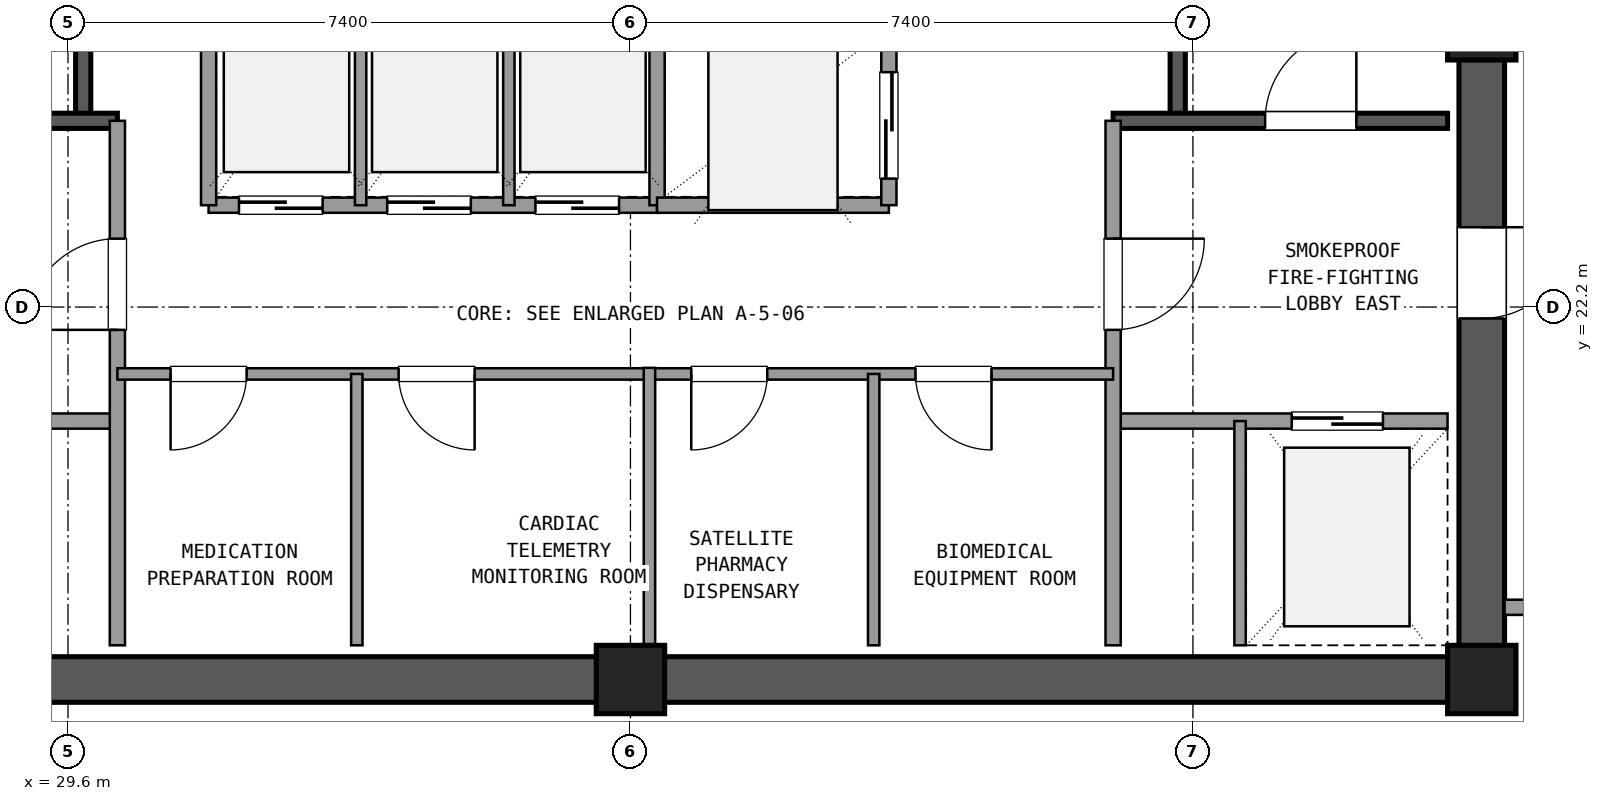
"""IFC4 building model, lengths in metres.
Left out: names, types, materials, properties, quantities, classifications, styles, units other than length and angle.
Written with IfcOpenShell. Run it as: python <this file> out.ifc"""

import sys

from ifc_helpers import new_model, si_unit, direction, frame, frame_2d, origin, origin_2d, place, context, subcontext, project, spatial, rectangle, extrude, element, fill, save


model = new_model("IFC4")
c1 = context("Model", 3, precision=1e-05, world=origin(), true_north=direction((0.0, 1.0)))
c2 = subcontext(c1, "Body", "Model", "MODEL_VIEW")
j1 = project(units=[si_unit("LENGTHUNIT", "METRE"), si_unit("PLANEANGLEUNIT", "RADIAN")], contexts=[c1])
p1 = place(None, origin())
s1 = spatial("IfcSite", under=j1, at=p1, CompositionType="ELEMENT")
p2 = place(p1, origin())
s2 = spatial("IfcBuilding", under=s1, at=p2, CompositionType="ELEMENT")
p3 = place(p2, frame((0.0, 0.0, 232.38)))
s3 = spatial("IfcBuildingStorey", under=s2, at=p3, CompositionType="ELEMENT", Elevation=232.38)
for number, where, z_axis, x_axis in (
    (1, (37.0, 17.3, 0.0), (0.0, 0.0, 1.0), (1.0, 0.0, 0.0)),
    (2, (48.2, 17.3, 0.0), (0.0, 0.0, 1.0), (1.0, 0.0, 0.0)),
    (3, (48.2, 25.9, 0.0), (0.0, 0.0, 1.0), (1.0, 0.0, 0.0)),
):
    element("IfcColumn", number, at=place(p3, frame(where, z_axis=z_axis, x_axis=x_axis)), inside=s3, PredefinedType="COLUMN", context=c2, shape_type="SweptSolid", body=[
        extrude(rectangle(XDim=0.9, YDim=0.9, at=origin_2d()), origin(), (0.0, 0.0, 1.0), 4.68),
    ])
for number, where, z_axis, x_axis in (
    (4, (26.245, 17.3, 0.0), (0.0, 0.0, 1.0), (1.0, 0.0, 0.0)),
    (5, (37.445, 17.3, 0.0), (0.0, 0.0, 1.0), (1.0, 0.0, 0.0)),
):
    element("IfcWall", number, at=place(p3, frame(where, z_axis=z_axis, x_axis=x_axis)), inside=s3, PredefinedType="SHEAR", context=c2, shape_type="SweptSolid", body=[
        extrude(rectangle(XDim=10.31, YDim=0.6, at=frame_2d((5.155, 0.0))), origin(), (0.0, 0.0, 1.0), 4.38),
    ])
p4 = place(p3, frame((48.2, 17.745, 0.0), z_axis=(0.0, 0.0, 1.0), x_axis=(0.0, 1.0, 0.0)))
e6 = element("IfcWall", 6, at=p4, inside=s3, PredefinedType="SHEAR", context=c2, shape_type="SweptSolid", body=[
    extrude(rectangle(XDim=7.71, YDim=0.6, at=frame_2d((3.855, 0.0))), origin(), (0.0, 0.0, 1.0), 4.38),
])
p5 = place(p4, frame((4.305, 0.0, 0.0)))
e7 = element("IfcOpeningElement", 7, at=p5, cuts=e6, PredefinedType="OPENING", context=c2, shape_type="SweptSolid", body=[
    extrude(rectangle(XDim=1.2, YDim=2.15, at=frame_2d((0.6, 1.075))), frame((0.0, 0.31, 0.0), z_axis=(0.0, -1.0, 0.0), x_axis=(1.0, 0.0, 0.0)), (0.0, 0.0, 1.0), 0.62),
])
p6 = place(p3, frame((29.8, 24.65, 0.0), z_axis=(0.0, 0.0, 1.0), x_axis=(0.0, 1.0, 0.0)))
e8 = element("IfcWall", 8, at=p6, inside=s3, PredefinedType="SHEAR", context=c2, shape_type="SweptSolid", body=[
    extrude(rectangle(XDim=9.4, YDim=0.2, at=frame_2d((4.7, 0.0))), origin(), (0.0, 0.0, 1.0), 4.38),
])
p7 = place(p3, frame((26.25, 24.65, 0.0), z_axis=(0.0, 0.0, 1.0), x_axis=(1.0, 0.0, 0.0)))
e9 = element("IfcWall", 9, at=p7, inside=s3, PredefinedType="SHEAR", context=c2, shape_type="SweptSolid", body=[
    extrude(rectangle(XDim=4.0, YDim=0.2, at=frame_2d((2.0, 0.0))), origin(), (0.0, 0.0, 1.0), 4.38),
])
p8 = place(p7, frame((1.0, 0.0, 0.0)))
e10 = element("IfcOpeningElement", 10, at=p8, cuts=e9, PredefinedType="OPENING", context=c2, shape_type="SweptSolid", body=[
    extrude(rectangle(XDim=1.2, YDim=2.15, at=frame_2d((0.6, 1.075))), frame((0.0, 0.11, 0.0), z_axis=(0.0, -1.0, 0.0), x_axis=(1.0, 0.0, 0.0)), (0.0, 0.0, 1.0), 0.22),
])
p9 = place(p3, frame((44.2, 24.65, 0.0), z_axis=(0.0, 0.0, 1.0), x_axis=(0.0, 1.0, 0.0)))
e11 = element("IfcWall", 11, at=p9, inside=s3, PredefinedType="SHEAR", context=c2, shape_type="SweptSolid", body=[
    extrude(rectangle(XDim=9.4, YDim=0.2, at=frame_2d((4.7, 0.0))), origin(), (0.0, 0.0, 1.0), 4.38),
])
p10 = place(p3, frame((43.35, 24.65, 0.0), z_axis=(0.0, 0.0, 1.0), x_axis=(1.0, 0.0, 0.0)))
e12 = element("IfcWall", 12, at=p10, inside=s3, PredefinedType="SHEAR", context=c2, shape_type="SweptSolid", body=[
    extrude(rectangle(XDim=4.4, YDim=0.2, at=frame_2d((2.2, 0.0))), origin(), (0.0, 0.0, 1.0), 4.38),
])
p11 = place(p10, frame((2.0, 0.0, 0.0)))
e13 = element("IfcOpeningElement", 13, at=p11, cuts=e12, PredefinedType="OPENING", context=c2, shape_type="SweptSolid", body=[
    extrude(rectangle(XDim=1.2, YDim=2.15, at=frame_2d((0.6, 1.075))), frame((0.0, 0.11, 0.0), z_axis=(0.0, -1.0, 0.0), x_axis=(1.0, 0.0, 0.0)), (0.0, 0.0, 1.0), 0.22),
])
p12 = place(p3, frame((26.25, 20.7, 0.0), z_axis=(0.0, 0.0, 1.0), x_axis=(1.0, 0.0, 0.0)))
e14 = element("IfcWall", 14, at=p12, inside=s3, PredefinedType="SOLIDWALL", context=c2, shape_type="SweptSolid", body=[
    extrude(rectangle(XDim=4.0, YDim=0.2, at=frame_2d((2.0, 0.0))), origin(), (0.0, 0.0, 1.0), 2.75),
])
p13 = place(p12, frame((0.65, 0.0, 0.0)))
e15 = element("IfcOpeningElement", 15, at=p13, cuts=e14, PredefinedType="OPENING", context=c2, shape_type="SweptSolid", body=[
    extrude(rectangle(XDim=1.2, YDim=2.15, at=frame_2d((0.6, 1.075))), frame((0.0, 0.11, 0.0), z_axis=(0.0, -1.0, 0.0), x_axis=(1.0, 0.0, 0.0)), (0.0, 0.0, 1.0), 0.22),
])
p14 = place(p3, frame((30.25, 17.75, 0.0), z_axis=(0.0, 0.0, 1.0), x_axis=(0.0, 1.0, 0.0)))
e16 = element("IfcWall", 16, at=p14, inside=s3, PredefinedType="SOLIDWALL", context=c2, shape_type="SweptSolid", body=[
    extrude(rectangle(XDim=6.9, YDim=0.2, at=frame_2d((3.45, 0.0))), origin(), (0.0, 0.0, 1.0), 2.75),
])
p15 = place(p14, frame((4.15, 0.0, 0.0)))
e17 = element("IfcOpeningElement", 17, at=p15, cuts=e16, PredefinedType="OPENING", context=c2, shape_type="SweptSolid", body=[
    extrude(rectangle(XDim=1.2, YDim=2.15, at=frame_2d((0.6, 1.075))), frame((0.0, 0.11, 0.0), z_axis=(0.0, -1.0, 0.0), x_axis=(1.0, 0.0, 0.0)), (0.0, 0.0, 1.0), 0.22),
])
p16 = place(p3, frame((43.35, 20.7, 0.0), z_axis=(0.0, 0.0, 1.0), x_axis=(1.0, 0.0, 0.0)))
e18 = element("IfcWall", 18, at=p16, inside=s3, PredefinedType="SOLIDWALL", context=c2, shape_type="SweptSolid", body=[
    extrude(rectangle(XDim=4.4, YDim=0.2, at=frame_2d((2.2, 0.0))), origin(), (0.0, 0.0, 1.0), 2.75),
])
p17 = place(p16, frame((2.35, 0.0, 0.0)))
e19 = element("IfcOpeningElement", 19, at=p17, cuts=e18, PredefinedType="OPENING", context=c2, shape_type="SweptSolid", body=[
    extrude(rectangle(XDim=1.2, YDim=2.15, at=frame_2d((0.6, 1.075))), frame((0.0, 0.11, 0.0), z_axis=(0.0, -1.0, 0.0), x_axis=(1.0, 0.0, 0.0)), (0.0, 0.0, 1.0), 0.22),
])
p18 = place(p3, frame((43.35, 17.75, 0.0), z_axis=(0.0, 0.0, 1.0), x_axis=(0.0, 1.0, 0.0)))
e20 = element("IfcWall", 20, at=p18, inside=s3, PredefinedType="SOLIDWALL", context=c2, shape_type="SweptSolid", body=[
    extrude(rectangle(XDim=6.9, YDim=0.2, at=frame_2d((3.45, 0.0))), origin(), (0.0, 0.0, 1.0), 2.75),
])
p19 = place(p18, frame((4.15, 0.0, 0.0)))
e21 = element("IfcOpeningElement", 21, at=p19, cuts=e20, PredefinedType="OPENING", context=c2, shape_type="SweptSolid", body=[
    extrude(rectangle(XDim=1.2, YDim=2.15, at=frame_2d((0.6, 1.075))), frame((0.0, 0.11, 0.0), z_axis=(0.0, -1.0, 0.0), x_axis=(1.0, 0.0, 0.0)), (0.0, 0.0, 1.0), 0.22),
])
p20 = place(p3, frame((45.02, 17.75, 0.0), z_axis=(0.0, 0.0, 1.0), x_axis=(0.0, 1.0, 0.0)))
e22 = element("IfcWall", 22, at=p20, inside=s3, PredefinedType="PARTITIONING", context=c2, shape_type="SweptSolid", body=[
    extrude(rectangle(XDim=2.95, YDim=0.15, at=frame_2d((1.475, 0.0))), origin(), (0.0, 0.0, 1.0), 2.75),
])
p21 = place(p3, frame((30.25, 21.32, 0.0), z_axis=(0.0, 0.0, 1.0), x_axis=(1.0, 0.0, 0.0)))
e23 = element("IfcWall", 23, at=p21, inside=s3, PredefinedType="PARTITIONING", context=c2, shape_type="SweptSolid", body=[
    extrude(rectangle(XDim=7.0, YDim=0.15, at=frame_2d((3.5, 0.0))), origin(), (0.0, 0.0, 1.0), 2.75),
])
p22 = place(p21, frame((0.7, 0.0, 0.0)))
e24 = element("IfcOpeningElement", 24, at=p22, cuts=e23, PredefinedType="OPENING", context=c2, shape_type="SweptSolid", body=[
    extrude(rectangle(XDim=1.0, YDim=2.15, at=frame_2d((0.5, 1.075))), frame((0.0, 0.085, 0.0), z_axis=(0.0, -1.0, 0.0), x_axis=(1.0, 0.0, 0.0)), (0.0, 0.0, 1.0), 0.17),
])
p23 = place(p21, frame((3.7, 0.0, 0.0)))
e25 = element("IfcOpeningElement", 25, at=p23, cuts=e23, PredefinedType="OPENING", context=c2, shape_type="SweptSolid", body=[
    extrude(rectangle(XDim=1.0, YDim=2.15, at=frame_2d((0.5, 1.075))), frame((0.0, 0.085, 0.0), z_axis=(0.0, -1.0, 0.0), x_axis=(1.0, 0.0, 0.0)), (0.0, 0.0, 1.0), 0.17),
])
p24 = place(p3, frame((33.4, 17.75, 0.0), z_axis=(0.0, 0.0, 1.0), x_axis=(0.0, 1.0, 0.0)))
e26 = element("IfcWall", 26, at=p24, inside=s3, PredefinedType="PARTITIONING", context=c2, shape_type="SweptSolid", body=[
    extrude(rectangle(XDim=3.57, YDim=0.15, at=frame_2d((1.785, 0.0))), origin(), (0.0, 0.0, 1.0), 2.75),
])
p25 = place(p3, frame((37.25, 21.32, 0.0), z_axis=(0.0, 0.0, 1.0), x_axis=(1.0, 0.0, 0.0)))
e27 = element("IfcWall", 27, at=p25, inside=s3, PredefinedType="PARTITIONING", context=c2, shape_type="SweptSolid", body=[
    extrude(rectangle(XDim=6.1, YDim=0.15, at=frame_2d((3.05, 0.0))), origin(), (0.0, 0.0, 1.0), 2.75),
])
p26 = place(p25, frame((0.55, 0.0, 0.0)))
e28 = element("IfcOpeningElement", 28, at=p26, cuts=e27, PredefinedType="OPENING", context=c2, shape_type="SweptSolid", body=[
    extrude(rectangle(XDim=1.0, YDim=2.15, at=frame_2d((0.5, 1.075))), frame((0.0, 0.085, 0.0), z_axis=(0.0, -1.0, 0.0), x_axis=(1.0, 0.0, 0.0)), (0.0, 0.0, 1.0), 0.17),
])
p27 = place(p25, frame((3.5, 0.0, 0.0)))
e29 = element("IfcOpeningElement", 29, at=p27, cuts=e27, PredefinedType="OPENING", context=c2, shape_type="SweptSolid", body=[
    extrude(rectangle(XDim=1.0, YDim=2.15, at=frame_2d((0.5, 1.075))), frame((0.0, 0.085, 0.0), z_axis=(0.0, -1.0, 0.0), x_axis=(1.0, 0.0, 0.0)), (0.0, 0.0, 1.0), 0.17),
])
p28 = place(p3, frame((40.2, 17.75, 0.0), z_axis=(0.0, 0.0, 1.0), x_axis=(0.0, 1.0, 0.0)))
e30 = element("IfcWall", 30, at=p28, inside=s3, PredefinedType="PARTITIONING", context=c2, shape_type="SweptSolid", body=[
    extrude(rectangle(XDim=3.57, YDim=0.15, at=frame_2d((1.785, 0.0))), origin(), (0.0, 0.0, 1.0), 2.75),
])
p29 = place(p3, frame((37.25, 17.75, 0.0), z_axis=(0.0, 0.0, 1.0), x_axis=(0.0, 1.0, 0.0)))
e31 = element("IfcWall", 31, at=p29, inside=s3, PredefinedType="PARTITIONING", context=c2, shape_type="SweptSolid", body=[
    extrude(rectangle(XDim=3.65, YDim=0.15, at=frame_2d((1.825, 0.0))), origin(), (0.0, 0.0, 1.0), 2.75),
])
p30 = place(p3, frame((31.45, 23.54, 0.0), z_axis=(0.0, 0.0, 1.0), x_axis=(1.0, 0.0, 0.0)))
e32 = element("IfcWall", 32, at=p30, inside=s3, PredefinedType="SOLIDWALL", context=c2, shape_type="SweptSolid", body=[
    extrude(rectangle(XDim=5.9, YDim=0.2, at=frame_2d((2.95, 0.0))), origin(), (0.0, 0.0, 1.0), 2.75),
])
p31 = place(p30, frame((0.4, 0.0, 0.0)))
e33 = element("IfcOpeningElement", 33, at=p31, cuts=e32, PredefinedType="OPENING", context=c2, shape_type="SweptSolid", body=[
    extrude(rectangle(XDim=1.1, YDim=2.15, at=frame_2d((0.55, 1.075))), frame((0.0, 0.11, 0.0), z_axis=(0.0, -1.0, 0.0), x_axis=(1.0, 0.0, 0.0)), (0.0, 0.0, 1.0), 0.22),
])
p32 = place(p30, frame((2.35, 0.0, 0.0)))
e34 = element("IfcOpeningElement", 34, at=p32, cuts=e32, PredefinedType="OPENING", context=c2, shape_type="SweptSolid", body=[
    extrude(rectangle(XDim=1.1, YDim=2.15, at=frame_2d((0.55, 1.075))), frame((0.0, 0.11, 0.0), z_axis=(0.0, -1.0, 0.0), x_axis=(1.0, 0.0, 0.0)), (0.0, 0.0, 1.0), 0.22),
])
p33 = place(p30, frame((4.3, 0.0, 0.0)))
e35 = element("IfcOpeningElement", 35, at=p33, cuts=e32, PredefinedType="OPENING", context=c2, shape_type="SweptSolid", body=[
    extrude(rectangle(XDim=1.1, YDim=2.15, at=frame_2d((0.55, 1.075))), frame((0.0, 0.11, 0.0), z_axis=(0.0, -1.0, 0.0), x_axis=(1.0, 0.0, 0.0)), (0.0, 0.0, 1.0), 0.22),
])
p34 = place(p3, frame((31.45, 23.54, 0.0), z_axis=(0.0, 0.0, 1.0), x_axis=(0.0, 1.0, 0.0)))
e36 = element("IfcWall", 36, at=p34, inside=s3, PredefinedType="SOLIDWALL", context=c2, shape_type="SweptSolid", body=[
    extrude(rectangle(XDim=2.81, YDim=0.2, at=frame_2d((1.405, 0.0))), origin(), (0.0, 0.0, 1.0), 2.75),
])
for number, where, z_axis, x_axis in (
    (37, (33.45, 23.54, 0.0), (0.0, 0.0, 1.0), (0.0, 1.0, 0.0)),
    (38, (35.4, 23.54, 0.0), (0.0, 0.0, 1.0), (0.0, 1.0, 0.0)),
):
    element("IfcWall", number, at=place(p3, frame(where, z_axis=z_axis, x_axis=x_axis)), inside=s3, PredefinedType="PARTITIONING", context=c2, shape_type="SweptSolid", body=[
        extrude(rectangle(XDim=2.81, YDim=0.15, at=frame_2d((1.405, 0.0))), origin(), (0.0, 0.0, 1.0), 2.75),
    ])
p35 = place(p3, frame((37.35, 23.54, 0.0), z_axis=(0.0, 0.0, 1.0), x_axis=(0.0, 1.0, 0.0)))
e39 = element("IfcWall", 39, at=p35, inside=s3, PredefinedType="SOLIDWALL", context=c2, shape_type="SweptSolid", body=[
    extrude(rectangle(XDim=6.82, YDim=0.2, at=frame_2d((3.41, 0.0))), origin(), (0.0, 0.0, 1.0), 2.75),
])
p36 = place(p3, frame((37.35, 23.54, 0.0), z_axis=(0.0, 0.0, 1.0), x_axis=(1.0, 0.0, 0.0)))
e40 = element("IfcWall", 40, at=p36, inside=s3, PredefinedType="SOLIDWALL", context=c2, shape_type="SweptSolid", body=[
    extrude(rectangle(XDim=3.05, YDim=0.2, at=frame_2d((1.525, 0.0))), origin(), (0.0, 0.0, 1.0), 2.75),
])
p37 = place(p3, frame((40.4, 23.54, 0.0), z_axis=(0.0, 0.0, 1.0), x_axis=(0.0, 1.0, 0.0)))
e41 = element("IfcWall", 41, at=p37, inside=s3, PredefinedType="SOLIDWALL", context=c2, shape_type="SweptSolid", body=[
    extrude(rectangle(XDim=6.82, YDim=0.2, at=frame_2d((3.41, 0.0))), origin(), (0.0, 0.0, 1.0), 2.75),
])
p38 = place(p37, frame((0.35, 0.0, 0.0)))
e42 = element("IfcOpeningElement", 42, at=p38, cuts=e41, PredefinedType="OPENING", context=c2, shape_type="SweptSolid", body=[
    extrude(rectangle(XDim=1.4, YDim=2.2, at=frame_2d((0.7, 1.1))), frame((0.0, 0.11, 0.0), z_axis=(0.0, -1.0, 0.0), x_axis=(1.0, 0.0, 0.0)), (0.0, 0.0, 1.0), 0.22),
])
p39 = place(p37, frame((2.65, 0.0, 0.0)))
e43 = element("IfcOpeningElement", 43, at=p39, cuts=e41, PredefinedType="OPENING", context=c2, shape_type="SweptSolid", body=[
    extrude(rectangle(XDim=1.4, YDim=2.2, at=frame_2d((0.7, 1.1))), frame((0.0, 0.11, 0.0), z_axis=(0.0, -1.0, 0.0), x_axis=(1.0, 0.0, 0.0)), (0.0, 0.0, 1.0), 0.22),
])
p40 = place(p37, frame((4.85, 0.0, 0.0)))
e44 = element("IfcOpeningElement", 44, at=p40, cuts=e41, PredefinedType="OPENING", context=c2, shape_type="SweptSolid", body=[
    extrude(rectangle(XDim=1.4, YDim=2.2, at=frame_2d((0.7, 1.1))), frame((0.0, 0.11, 0.0), z_axis=(0.0, -1.0, 0.0), x_axis=(1.0, 0.0, 0.0)), (0.0, 0.0, 1.0), 0.22),
])
p41 = place(p3, frame((48.5, 18.25, 0.0), z_axis=(0.0, 0.0, 1.0), x_axis=(1.0, 0.0, 0.0)))
e45 = element("IfcWall", 45, at=p41, inside=s3, PredefinedType="SOLIDWALL", context=c2, shape_type="SweptSolid", body=[
    extrude(rectangle(XDim=10.5, YDim=0.2, at=frame_2d((5.25, 0.0))), origin(), (0.0, 0.0, 1.0), 2.75),
])
p42 = place(p11, origin())
e46 = element("IfcDoor", 46, at=p42, inside=s3, OperationType="SINGLE_SWING_RIGHT", PredefinedType="DOOR", context=c2, shape_type="SweptSolid", body=[
    extrude(rectangle(XDim=1.2, YDim=2.15, at=frame_2d((0.6, 1.075))), frame((0.0, 0.025, 0.0), z_axis=(0.0, -1.0, 0.0), x_axis=(1.0, 0.0, 0.0)), (0.0, 0.0, 1.0), 0.05),
])
fill(e13, e46)
p43 = place(p15, origin())
e47 = element("IfcDoor", 47, at=p43, inside=s3, OperationType="SINGLE_SWING_LEFT", PredefinedType="DOOR", context=c2, shape_type="SweptSolid", body=[
    extrude(rectangle(XDim=1.2, YDim=2.15, at=frame_2d((0.6, 1.075))), frame((0.0, 0.025, 0.0), z_axis=(0.0, -1.0, 0.0), x_axis=(1.0, 0.0, 0.0)), (0.0, 0.0, 1.0), 0.05),
])
fill(e17, e47)
p44 = place(p17, origin())
e48 = element("IfcDoor", 48, at=p44, inside=s3, OperationType="SLIDING_TO_RIGHT", PredefinedType="DOOR", context=c2, shape_type="SweptSolid", body=[
    extrude(rectangle(XDim=1.2, YDim=2.15, at=frame_2d((0.6, 1.075))), frame((0.0, 0.025, 0.0), z_axis=(0.0, -1.0, 0.0), x_axis=(1.0, 0.0, 0.0)), (0.0, 0.0, 1.0), 0.05),
])
fill(e19, e48)
p45 = place(p19, frame((1.2, 0.0, 0.0), z_axis=(0.0, 0.0, 1.0), x_axis=(-1.0, 0.0, 0.0)))
e49 = element("IfcDoor", 49, at=p45, inside=s3, OperationType="SINGLE_SWING_RIGHT", PredefinedType="DOOR", context=c2, shape_type="SweptSolid", body=[
    extrude(rectangle(XDim=1.2, YDim=2.15, at=frame_2d((0.6, 1.075))), frame((0.0, 0.025, 0.0), z_axis=(0.0, -1.0, 0.0), x_axis=(1.0, 0.0, 0.0)), (0.0, 0.0, 1.0), 0.05),
])
fill(e21, e49)
p46 = place(p5, frame((1.2, 0.0, 0.0), z_axis=(0.0, 0.0, 1.0), x_axis=(-1.0, 0.0, 0.0)))
e50 = element("IfcDoor", 50, at=p46, inside=s3, OperationType="SINGLE_SWING_RIGHT", PredefinedType="DOOR", context=c2, shape_type="SweptSolid", body=[
    extrude(rectangle(XDim=1.2, YDim=2.15, at=frame_2d((0.6, 1.075))), frame((0.0, 0.025, 0.0), z_axis=(0.0, -1.0, 0.0), x_axis=(1.0, 0.0, 0.0)), (0.0, 0.0, 1.0), 0.05),
])
fill(e7, e50)
p47 = place(p22, frame((1.0, 0.0, 0.0), z_axis=(0.0, 0.0, 1.0), x_axis=(-1.0, 0.0, 0.0)))
e51 = element("IfcDoor", 51, at=p47, inside=s3, OperationType="SINGLE_SWING_LEFT", PredefinedType="DOOR", context=c2, shape_type="SweptSolid", body=[
    extrude(rectangle(XDim=1.0, YDim=2.15, at=frame_2d((0.5, 1.075))), frame((0.0, 0.025, 0.0), z_axis=(0.0, -1.0, 0.0), x_axis=(1.0, 0.0, 0.0)), (0.0, 0.0, 1.0), 0.05),
])
fill(e24, e51)
p48 = place(p23, frame((1.0, 0.0, 0.0), z_axis=(0.0, 0.0, 1.0), x_axis=(-1.0, 0.0, 0.0)))
e52 = element("IfcDoor", 52, at=p48, inside=s3, OperationType="SINGLE_SWING_RIGHT", PredefinedType="DOOR", context=c2, shape_type="SweptSolid", body=[
    extrude(rectangle(XDim=1.0, YDim=2.15, at=frame_2d((0.5, 1.075))), frame((0.0, 0.025, 0.0), z_axis=(0.0, -1.0, 0.0), x_axis=(1.0, 0.0, 0.0)), (0.0, 0.0, 1.0), 0.05),
])
fill(e25, e52)
p49 = place(p26, frame((1.0, 0.0, 0.0), z_axis=(0.0, 0.0, 1.0), x_axis=(-1.0, 0.0, 0.0)))
e53 = element("IfcDoor", 53, at=p49, inside=s3, OperationType="SINGLE_SWING_LEFT", PredefinedType="DOOR", context=c2, shape_type="SweptSolid", body=[
    extrude(rectangle(XDim=1.0, YDim=2.15, at=frame_2d((0.5, 1.075))), frame((0.0, 0.025, 0.0), z_axis=(0.0, -1.0, 0.0), x_axis=(1.0, 0.0, 0.0)), (0.0, 0.0, 1.0), 0.05),
])
fill(e28, e53)
p50 = place(p27, frame((1.0, 0.0, 0.0), z_axis=(0.0, 0.0, 1.0), x_axis=(-1.0, 0.0, 0.0)))
e54 = element("IfcDoor", 54, at=p50, inside=s3, OperationType="SINGLE_SWING_RIGHT", PredefinedType="DOOR", context=c2, shape_type="SweptSolid", body=[
    extrude(rectangle(XDim=1.0, YDim=2.15, at=frame_2d((0.5, 1.075))), frame((0.0, 0.025, 0.0), z_axis=(0.0, -1.0, 0.0), x_axis=(1.0, 0.0, 0.0)), (0.0, 0.0, 1.0), 0.05),
])
fill(e29, e54)
p51 = place(p31, origin())
e55 = element("IfcDoor", 55, at=p51, inside=s3, OperationType="SLIDING_TO_RIGHT", PredefinedType="DOOR", context=c2, shape_type="SweptSolid", body=[
    extrude(rectangle(XDim=1.1, YDim=2.15, at=frame_2d((0.55, 1.075))), frame((0.0, 0.025, 0.0), z_axis=(0.0, -1.0, 0.0), x_axis=(1.0, 0.0, 0.0)), (0.0, 0.0, 1.0), 0.05),
])
fill(e33, e55)
p52 = place(p32, origin())
e56 = element("IfcDoor", 56, at=p52, inside=s3, OperationType="SLIDING_TO_RIGHT", PredefinedType="DOOR", context=c2, shape_type="SweptSolid", body=[
    extrude(rectangle(XDim=1.1, YDim=2.15, at=frame_2d((0.55, 1.075))), frame((0.0, 0.025, 0.0), z_axis=(0.0, -1.0, 0.0), x_axis=(1.0, 0.0, 0.0)), (0.0, 0.0, 1.0), 0.05),
])
fill(e34, e56)
p53 = place(p33, origin())
e57 = element("IfcDoor", 57, at=p53, inside=s3, OperationType="SLIDING_TO_RIGHT", PredefinedType="DOOR", context=c2, shape_type="SweptSolid", body=[
    extrude(rectangle(XDim=1.1, YDim=2.15, at=frame_2d((0.55, 1.075))), frame((0.0, 0.025, 0.0), z_axis=(0.0, -1.0, 0.0), x_axis=(1.0, 0.0, 0.0)), (0.0, 0.0, 1.0), 0.05),
])
fill(e35, e57)
p54 = place(p38, origin())
e58 = element("IfcDoor", 58, at=p54, inside=s3, OperationType="SLIDING_TO_LEFT", PredefinedType="DOOR", context=c2, shape_type="SweptSolid", body=[
    extrude(rectangle(XDim=1.4, YDim=2.2, at=frame_2d((0.7, 1.1))), frame((0.0, 0.025, 0.0), z_axis=(0.0, -1.0, 0.0), x_axis=(1.0, 0.0, 0.0)), (0.0, 0.0, 1.0), 0.05),
])
fill(e42, e58)
save(model, sys.argv[1])
